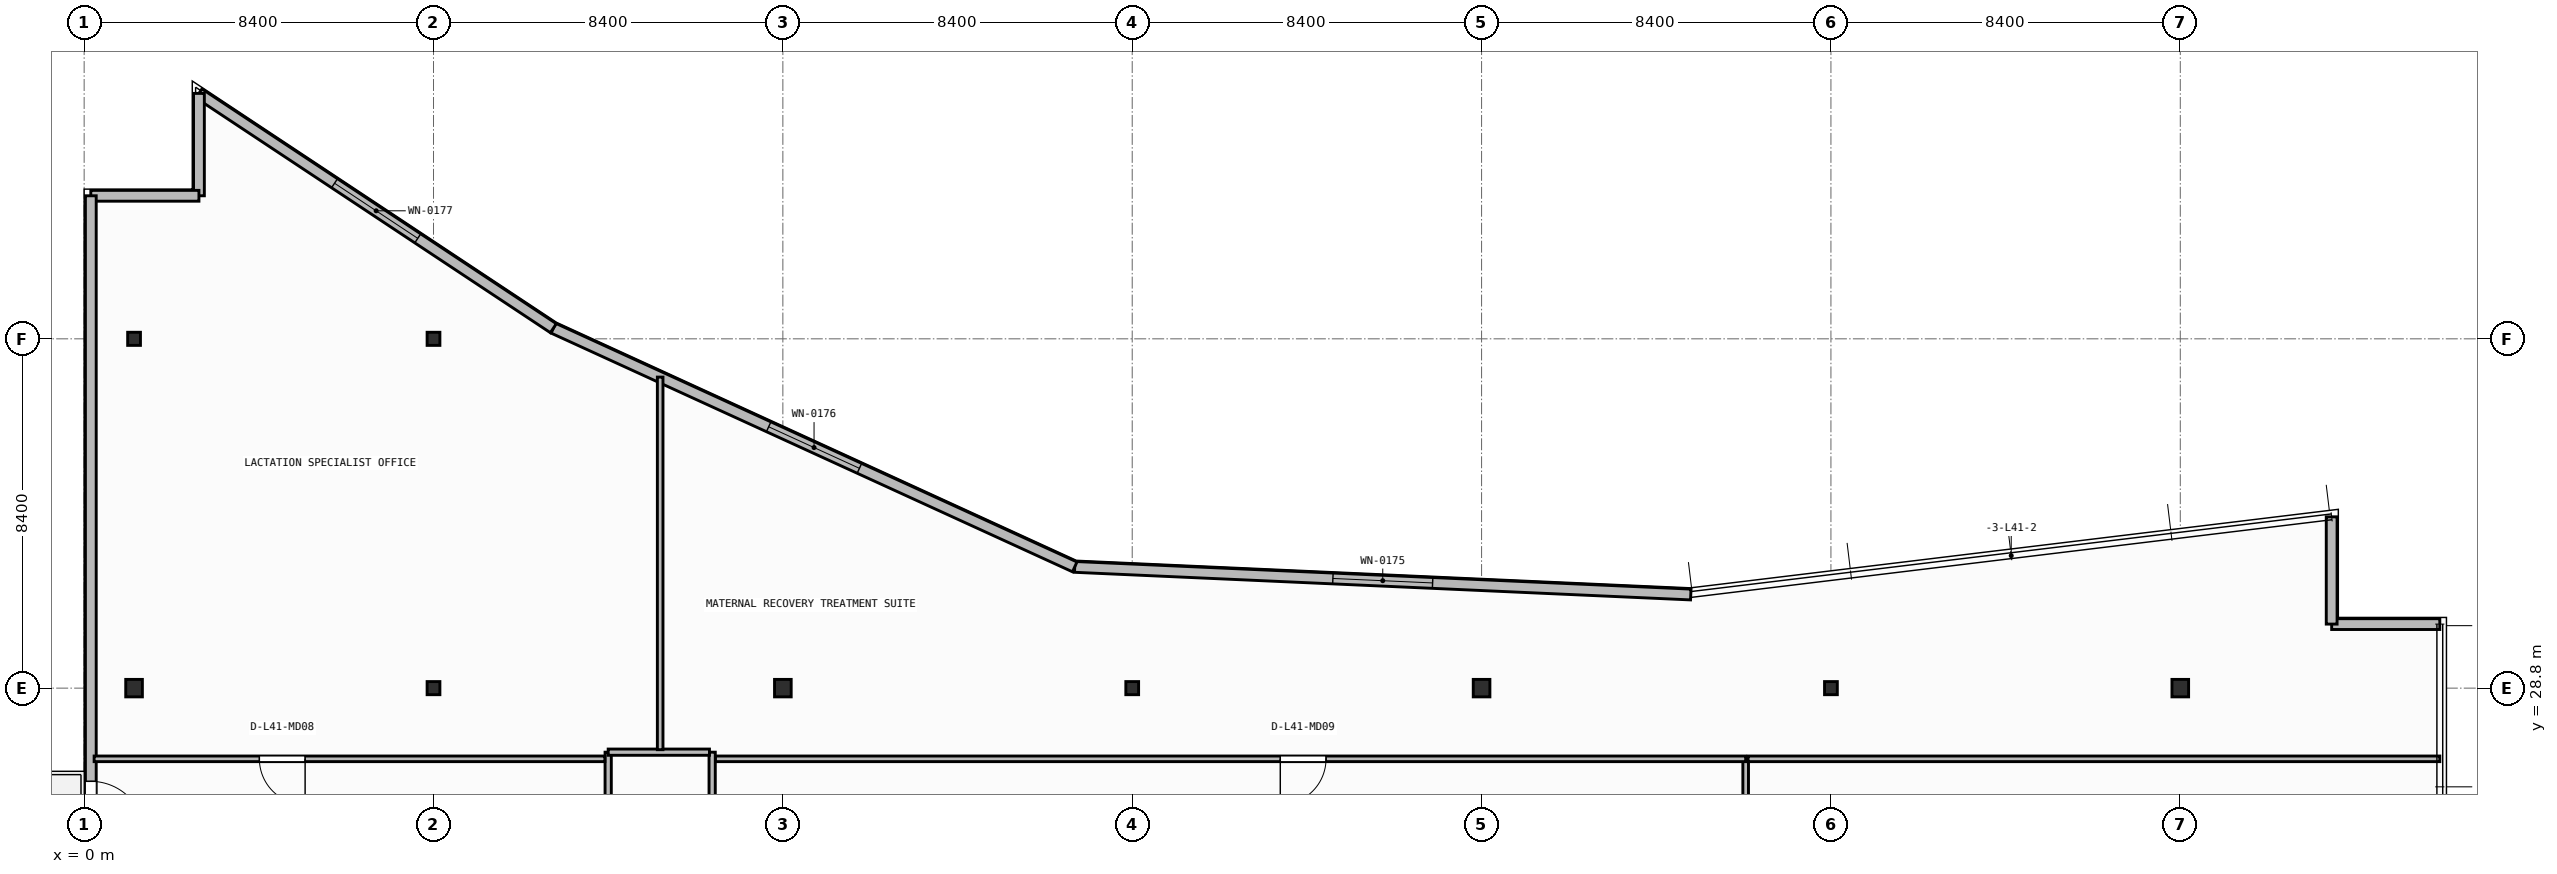
"""IFC4 building model, lengths in metres.
Left out: names, types, materials, properties, quantities, classifications, styles, units other than length and angle.
Written with IfcOpenShell. Run it as: python <this file> out.ifc"""

import sys

from ifc_helpers import new_model, si_unit, direction, frame, frame_2d, origin, origin_2d, place, context, subcontext, project, spatial, rectangle, i_section, extrude, element, fill, save


model = new_model("IFC4")
c1 = context("Model", 3, precision=1e-05, world=origin(), true_north=direction((0.0, 1.0)))
c2 = subcontext(c1, "Body", "Model", "MODEL_VIEW")
j1 = project(units=[si_unit("LENGTHUNIT", "METRE"), si_unit("PLANEANGLEUNIT", "RADIAN")], contexts=[c1])
p1 = place(None, origin())
s1 = spatial("IfcSite", under=j1, at=p1, CompositionType="ELEMENT")
p2 = place(p1, origin())
s2 = spatial("IfcBuilding", under=s1, at=p2, CompositionType="ELEMENT")
p3 = place(p2, frame((0.0, 0.0, 166.55)))
s3 = spatial("IfcBuildingStorey", under=s2, at=p3, CompositionType="ELEMENT", Elevation=166.55)
p4 = place(p3, frame((1.2, 28.8, 0.0), z_axis=(0.0, 0.0, 1.0), x_axis=(1.0, 0.0, 0.0)))
e1 = element("IfcColumn", 1, at=p4, inside=s3, PredefinedType="COLUMN", context=c2, shape_type="SweptSolid", body=[
    extrude(i_section(OverallWidth=0.4, OverallDepth=0.42, WebThickness=0.025, FlangeThickness=0.04, at=origin_2d()), origin(), (0.0, 0.0, 1.0), 3.95),
])
p5 = place(p3, frame((8.4, 28.8, 0.0), z_axis=(0.0, 0.0, 1.0), x_axis=(1.0, 0.0, 0.0)))
e2 = element("IfcColumn", 2, at=p5, inside=s3, PredefinedType="COLUMN", context=c2, shape_type="SweptSolid", body=[
    extrude(i_section(OverallWidth=0.307, OverallDepth=0.315, WebThickness=0.012, FlangeThickness=0.019, FilletRadius=0.017, at=origin_2d()), origin(), (0.0, 0.0, 1.0), 3.95),
])
p6 = place(p3, frame((16.8, 28.8, 0.0), z_axis=(0.0, 0.0, 1.0), x_axis=(1.0, 0.0, 0.0)))
e3 = element("IfcColumn", 3, at=p6, inside=s3, PredefinedType="COLUMN", context=c2, shape_type="SweptSolid", body=[
    extrude(i_section(OverallWidth=0.4, OverallDepth=0.42, WebThickness=0.025, FlangeThickness=0.04, at=origin_2d()), origin(), (0.0, 0.0, 1.0), 3.95),
])
p7 = place(p3, frame((25.2, 28.8, 0.0), z_axis=(0.0, 0.0, 1.0), x_axis=(1.0, 0.0, 0.0)))
e4 = element("IfcColumn", 4, at=p7, inside=s3, PredefinedType="COLUMN", context=c2, shape_type="SweptSolid", body=[
    extrude(i_section(OverallWidth=0.307, OverallDepth=0.315, WebThickness=0.012, FlangeThickness=0.019, FilletRadius=0.017, at=origin_2d()), origin(), (0.0, 0.0, 1.0), 3.95),
])
p8 = place(p3, frame((33.6, 28.8, 0.0), z_axis=(0.0, 0.0, 1.0), x_axis=(1.0, 0.0, 0.0)))
e5 = element("IfcColumn", 5, at=p8, inside=s3, PredefinedType="COLUMN", context=c2, shape_type="SweptSolid", body=[
    extrude(i_section(OverallWidth=0.4, OverallDepth=0.42, WebThickness=0.025, FlangeThickness=0.04, at=origin_2d()), origin(), (0.0, 0.0, 1.0), 3.95),
])
p9 = place(p3, frame((42.0, 28.8, 0.0), z_axis=(0.0, 0.0, 1.0), x_axis=(1.0, 0.0, 0.0)))
e6 = element("IfcColumn", 6, at=p9, inside=s3, PredefinedType="COLUMN", context=c2, shape_type="SweptSolid", body=[
    extrude(i_section(OverallWidth=0.307, OverallDepth=0.315, WebThickness=0.012, FlangeThickness=0.019, FilletRadius=0.017, at=origin_2d()), origin(), (0.0, 0.0, 1.0), 3.95),
])
p10 = place(p3, frame((50.4, 28.8, 0.0), z_axis=(0.0, 0.0, 1.0), x_axis=(1.0, 0.0, 0.0)))
e7 = element("IfcColumn", 7, at=p10, inside=s3, PredefinedType="COLUMN", context=c2, shape_type="SweptSolid", body=[
    extrude(i_section(OverallWidth=0.4, OverallDepth=0.42, WebThickness=0.025, FlangeThickness=0.04, at=origin_2d()), origin(), (0.0, 0.0, 1.0), 3.95),
])
for number, where, z_axis, x_axis in (
    (8, (1.2, 37.2, 0.0), (0.0, 0.0, 1.0), (1.0, 0.0, 0.0)),
    (9, (8.4, 37.2, 0.0), (0.0, 0.0, 1.0), (1.0, 0.0, 0.0)),
):
    element("IfcColumn", number, at=place(p3, frame(where, z_axis=z_axis, x_axis=x_axis)), inside=s3, PredefinedType="COLUMN", context=c2, shape_type="SweptSolid", body=[
        extrude(i_section(OverallWidth=0.307, OverallDepth=0.315, WebThickness=0.012, FlangeThickness=0.019, FilletRadius=0.017, at=origin_2d()), origin(), (0.0, 0.0, 1.0), 3.95),
    ])
p11 = place(p3, frame((56.64, 30.34, 0.0), z_axis=(0.0, 0.0, 1.0), x_axis=(-1.0, 0.0, 0.0)))
e10 = element("IfcWall", 10, at=p11, inside=s3, PredefinedType="STANDARD", context=c2, shape_type="SweptSolid", body=[
    extrude(rectangle(XDim=2.6, YDim=0.26, at=frame_2d((1.3, 0.0))), origin(), (0.0, 0.0, 1.0), 3.71),
])
p12 = place(p3, frame((54.04, 30.34, 0.0), z_axis=(0.0, 0.0, 1.0), x_axis=(0.0, 1.0, 0.0)))
e11 = element("IfcWall", 11, at=p12, inside=s3, PredefinedType="STANDARD", context=c2, shape_type="SweptSolid", body=[
    extrude(rectangle(XDim=2.579, YDim=0.26, at=frame_2d((1.29, 0.0))), origin(), (0.0, 0.0, 1.0), 3.71),
])
p13 = place(p3, frame((38.63, 31.052, 0.0), z_axis=(0.0, 0.0, 1.0), x_axis=(-0.998996592956, 0.044786239663, 0.0)))
e12 = element("IfcWall", 12, at=p13, inside=s3, PredefinedType="STANDARD", context=c2, shape_type="SweptSolid", body=[
    extrude(rectangle(XDim=14.827, YDim=0.26, at=frame_2d((7.414, 0.0))), origin(), (0.0, 0.0, 1.0), 3.71),
])
p14 = place(p13, frame((6.214, 0.0, 0.9)))
e13 = element("IfcOpeningElement", 13, at=p14, cuts=e12, PredefinedType="OPENING", context=c2, shape_type="SweptSolid", body=[
    extrude(rectangle(XDim=2.4, YDim=1.65, at=frame_2d((1.2, 0.825))), frame((0.0, 0.14, 0.0), z_axis=(0.0, -1.0, 0.0), x_axis=(1.0, 0.0, 0.0)), (0.0, 0.0, 1.0), 0.28),
])
p15 = place(p3, frame((23.818, 31.716, 0.0), z_axis=(0.0, 0.0, 1.0), x_axis=(-0.909209527513, 0.416338846471, 0.0)))
e14 = element("IfcWall", 14, at=p15, inside=s3, PredefinedType="STANDARD", context=c2, shape_type="SweptSolid", body=[
    extrude(rectangle(XDim=13.787, YDim=0.26, at=frame_2d((6.894, 0.0))), origin(), (0.0, 0.0, 1.0), 3.71),
])
p16 = place(p15, frame((5.694, 0.0, 0.9)))
e15 = element("IfcOpeningElement", 15, at=p16, cuts=e14, PredefinedType="OPENING", context=c2, shape_type="SweptSolid", body=[
    extrude(rectangle(XDim=2.4, YDim=1.65, at=frame_2d((1.2, 0.825))), frame((0.0, 0.14, 0.0), z_axis=(0.0, -1.0, 0.0), x_axis=(1.0, 0.0, 0.0)), (0.0, 0.0, 1.0), 0.28),
])
p17 = place(p3, frame((11.282, 37.456, 0.0), z_axis=(0.0, 0.0, 1.0), x_axis=(-0.833630474253, 0.552322580017, 0.0)))
e16 = element("IfcWall", 16, at=p17, inside=s3, PredefinedType="STANDARD", context=c2, shape_type="SweptSolid", body=[
    extrude(rectangle(XDim=10.223, YDim=0.26, at=frame_2d((5.111, 0.0))), origin(), (0.0, 0.0, 1.0), 3.71),
])
p18 = place(p17, frame((3.911, 0.0, 0.9)))
e17 = element("IfcOpeningElement", 17, at=p18, cuts=e16, PredefinedType="OPENING", context=c2, shape_type="SweptSolid", body=[
    extrude(rectangle(XDim=2.4, YDim=1.65, at=frame_2d((1.2, 0.825))), frame((0.0, 0.14, 0.0), z_axis=(0.0, -1.0, 0.0), x_axis=(1.0, 0.0, 0.0)), (0.0, 0.0, 1.0), 0.28),
])
p19 = place(p3, frame((2.76, 43.102, 0.0), z_axis=(0.0, 0.0, 1.0), x_axis=(0.0, -1.0, 0.0)))
e18 = element("IfcWall", 18, at=p19, inside=s3, PredefinedType="STANDARD", context=c2, shape_type="SweptSolid", body=[
    extrude(rectangle(XDim=2.462, YDim=0.26, at=frame_2d((1.231, 0.0))), origin(), (0.0, 0.0, 1.0), 3.71),
])
p20 = place(p3, frame((2.76, 40.64, 0.0), z_axis=(0.0, 0.0, 1.0), x_axis=(-1.0, 0.0, 0.0)))
e19 = element("IfcWall", 19, at=p20, inside=s3, PredefinedType="STANDARD", context=c2, shape_type="SweptSolid", body=[
    extrude(rectangle(XDim=2.6, YDim=0.26, at=frame_2d((1.3, 0.0))), origin(), (0.0, 0.0, 1.0), 3.71),
])
p21 = place(p3, frame((0.16, 40.64, 0.0), z_axis=(0.0, 0.0, 1.0), x_axis=(0.0, -1.0, 0.0)))
e20 = element("IfcWall", 20, at=p21, inside=s3, PredefinedType="STANDARD", context=c2, shape_type="SweptSolid", body=[
    extrude(rectangle(XDim=37.88, YDim=0.26, at=frame_2d((18.94, 0.0))), origin(), (0.0, 0.0, 1.0), 3.71),
])
p22 = place(p21, frame((14.081, 0.0, 0.0)))
e21 = element("IfcOpeningElement", 21, at=p22, cuts=e20, PredefinedType="OPENING", context=c2, shape_type="SweptSolid", body=[
    extrude(rectangle(XDim=1.3, YDim=2.15, at=frame_2d((0.65, 1.075))), frame((0.0, 0.14, 0.0), z_axis=(0.0, -1.0, 0.0), x_axis=(1.0, 0.0, 0.0)), (0.0, 0.0, 1.0), 0.28),
])
p23 = place(p3, frame((12.6, 27.26, 0.0), z_axis=(0.0, 0.0, 1.0), x_axis=(0.0, -1.0, 0.0)))
e22 = element("IfcWall", 22, at=p23, inside=s3, PredefinedType="PARTITIONING", context=c2, shape_type="SweptSolid", body=[
    extrude(rectangle(XDim=5.632, YDim=0.15, at=frame_2d((2.816, 0.0))), origin(), (0.0, 0.0, 1.0), 3.71),
])
p24 = place(p23, frame((2.266, 0.0, 0.0)))
e23 = element("IfcOpeningElement", 23, at=p24, cuts=e22, PredefinedType="OPENING", context=c2, shape_type="SweptSolid", body=[
    extrude(rectangle(XDim=1.1, YDim=2.1, at=frame_2d((0.55, 1.05))), frame((0.0, 0.085, 0.0), z_axis=(0.0, -1.0, 0.0), x_axis=(1.0, 0.0, 0.0)), (0.0, 0.0, 1.0), 0.17),
])
p25 = place(p3, frame((15.1, 24.504, 0.0), z_axis=(0.0, 0.0, 1.0), x_axis=(0.0, 1.0, 0.0)))
e24 = element("IfcWall", 24, at=p25, inside=s3, PredefinedType="PARTITIONING", context=c2, shape_type="SweptSolid", body=[
    extrude(rectangle(XDim=2.756, YDim=0.15, at=frame_2d((1.378, 0.0))), origin(), (0.0, 0.0, 1.0), 3.71),
])
p26 = place(p25, frame((0.294, 0.0, 0.0)))
e25 = element("IfcOpeningElement", 25, at=p26, cuts=e24, PredefinedType="OPENING", context=c2, shape_type="SweptSolid", body=[
    extrude(rectangle(XDim=1.1, YDim=2.1, at=frame_2d((0.55, 1.05))), frame((0.0, 0.085, 0.0), z_axis=(0.0, -1.0, 0.0), x_axis=(1.0, 0.0, 0.0)), (0.0, 0.0, 1.0), 0.17),
])
p27 = place(p3, frame((15.035, 27.26, 0.0), z_axis=(0.0, 0.0, 1.0), x_axis=(-1.0, 0.0, 0.0)))
e26 = element("IfcWall", 26, at=p27, inside=s3, PredefinedType="PARTITIONING", context=c2, shape_type="SweptSolid", body=[
    extrude(rectangle(XDim=2.435, YDim=0.15, at=frame_2d((1.217, 0.0))), origin(), (0.0, 0.0, 1.0), 3.71),
])
p28 = place(p3, frame((12.52, 27.1, 0.0), z_axis=(0.0, 0.0, 1.0), x_axis=(-1.0, 0.0, 0.0)))
e27 = element("IfcWall", 27, at=p28, inside=s3, PredefinedType="PARTITIONING", context=c2, shape_type="SweptSolid", body=[
    extrude(rectangle(XDim=12.28, YDim=0.135, at=frame_2d((6.14, 0.0))), origin(), (0.0, 0.0, 1.0), 3.71),
])
p29 = place(p28, frame((7.207, 0.0, 0.0)))
e28 = element("IfcOpeningElement", 28, at=p29, cuts=e27, PredefinedType="OPENING", context=c2, shape_type="SweptSolid", body=[
    extrude(rectangle(XDim=1.1, YDim=2.1, at=frame_2d((0.55, 1.05))), frame((0.0, 0.077, 0.0), z_axis=(0.0, -1.0, 0.0), x_axis=(1.0, 0.0, 0.0)), (0.0, 0.0, 1.0), 0.155),
])
p30 = place(p3, frame((39.95, 24.715, 0.0), z_axis=(0.0, 0.0, 1.0), x_axis=(0.0, 1.0, 0.0)))
e29 = element("IfcWall", 29, at=p30, inside=s3, PredefinedType="PARTITIONING", context=c2, shape_type="SweptSolid", body=[
    extrude(rectangle(XDim=2.385, YDim=0.135, at=frame_2d((1.192, 0.0))), origin(), (0.0, 0.0, 1.0), 3.71),
])
p31 = place(p3, frame((39.95, 27.1, 0.0), z_axis=(0.0, 0.0, 1.0), x_axis=(-1.0, 0.0, 0.0)))
e30 = element("IfcWall", 30, at=p31, inside=s3, PredefinedType="PARTITIONING", context=c2, shape_type="SweptSolid", body=[
    extrude(rectangle(XDim=24.77, YDim=0.135, at=frame_2d((12.385, 0.0))), origin(), (0.0, 0.0, 1.0), 3.71),
])
p32 = place(p31, frame((10.09, 0.0, 0.0)))
e31 = element("IfcOpeningElement", 31, at=p32, cuts=e30, PredefinedType="OPENING", context=c2, shape_type="SweptSolid", body=[
    extrude(rectangle(XDim=1.1, YDim=2.1, at=frame_2d((0.55, 1.05))), frame((0.0, 0.077, 0.0), z_axis=(0.0, -1.0, 0.0), x_axis=(1.0, 0.0, 0.0)), (0.0, 0.0, 1.0), 0.155),
])
p33 = place(p3, frame((56.64, 27.1, 0.0), z_axis=(0.0, 0.0, 1.0), x_axis=(-1.0, 0.0, 0.0)))
e32 = element("IfcWall", 32, at=p33, inside=s3, PredefinedType="PARTITIONING", context=c2, shape_type="SweptSolid", body=[
    extrude(rectangle(XDim=16.632, YDim=0.135, at=frame_2d((8.316, 0.0))), origin(), (0.0, 0.0, 1.0), 3.71),
])
p34 = place(p3, frame((13.85, 27.32, 0.0), z_axis=(0.0, 0.0, 1.0), x_axis=(0.0, 1.0, 0.0)))
e33 = element("IfcWall", 33, at=p34, inside=s3, PredefinedType="PARTITIONING", context=c2, shape_type="SweptSolid", body=[
    extrude(rectangle(XDim=8.96, YDim=0.135, at=frame_2d((4.48, 0.0))), origin(), (0.0, 0.0, 1.0), 3.71),
])
p35 = place(p14, origin())
e34 = element("IfcWindow", 34, at=p35, inside=s3, PartitioningType="SINGLE_PANEL", PredefinedType="WINDOW", context=c2, shape_type="SweptSolid", body=[
    extrude(rectangle(XDim=2.4, YDim=1.65, at=frame_2d((1.2, 0.825))), frame((0.0, 0.03, 0.0), z_axis=(0.0, -1.0, 0.0), x_axis=(1.0, 0.0, 0.0)), (0.0, 0.0, 1.0), 0.06),
])
fill(e13, e34)
p36 = place(p16, origin())
e35 = element("IfcWindow", 35, at=p36, inside=s3, PartitioningType="SINGLE_PANEL", PredefinedType="WINDOW", context=c2, shape_type="SweptSolid", body=[
    extrude(rectangle(XDim=2.4, YDim=1.65, at=frame_2d((1.2, 0.825))), frame((0.0, 0.03, 0.0), z_axis=(0.0, -1.0, 0.0), x_axis=(1.0, 0.0, 0.0)), (0.0, 0.0, 1.0), 0.06),
])
fill(e15, e35)
p37 = place(p18, origin())
e36 = element("IfcWindow", 36, at=p37, inside=s3, PartitioningType="SINGLE_PANEL", PredefinedType="WINDOW", context=c2, shape_type="SweptSolid", body=[
    extrude(rectangle(XDim=2.4, YDim=1.65, at=frame_2d((1.2, 0.825))), frame((0.0, 0.03, 0.0), z_axis=(0.0, -1.0, 0.0), x_axis=(1.0, 0.0, 0.0)), (0.0, 0.0, 1.0), 0.06),
])
fill(e17, e36)
p38 = place(p22, origin())
e37 = element("IfcDoor", 37, at=p38, inside=s3, OperationType="SINGLE_SWING_RIGHT", PredefinedType="DOOR", context=c2, shape_type="SweptSolid", body=[
    extrude(rectangle(XDim=1.3, YDim=2.15, at=frame_2d((0.65, 1.075))), frame((0.0, 0.025, 0.0), z_axis=(0.0, -1.0, 0.0), x_axis=(1.0, 0.0, 0.0)), (0.0, 0.0, 1.0), 0.05),
])
fill(e21, e37)
p39 = place(p29, origin())
e38 = element("IfcDoor", 38, at=p39, inside=s3, OperationType="SINGLE_SWING_LEFT", PredefinedType="DOOR", context=c2, shape_type="SweptSolid", body=[
    extrude(rectangle(XDim=1.1, YDim=2.1, at=frame_2d((0.55, 1.05))), frame((0.0, 0.025, 0.0), z_axis=(0.0, -1.0, 0.0), x_axis=(1.0, 0.0, 0.0)), (0.0, 0.0, 1.0), 0.05),
])
fill(e28, e38)
p40 = place(p32, origin())
e39 = element("IfcDoor", 39, at=p40, inside=s3, OperationType="SINGLE_SWING_RIGHT", PredefinedType="DOOR", context=c2, shape_type="SweptSolid", body=[
    extrude(rectangle(XDim=1.1, YDim=2.1, at=frame_2d((0.55, 1.05))), frame((0.0, 0.025, 0.0), z_axis=(0.0, -1.0, 0.0), x_axis=(1.0, 0.0, 0.0)), (0.0, 0.0, 1.0), 0.05),
])
fill(e31, e39)
save(model, sys.argv[1])
